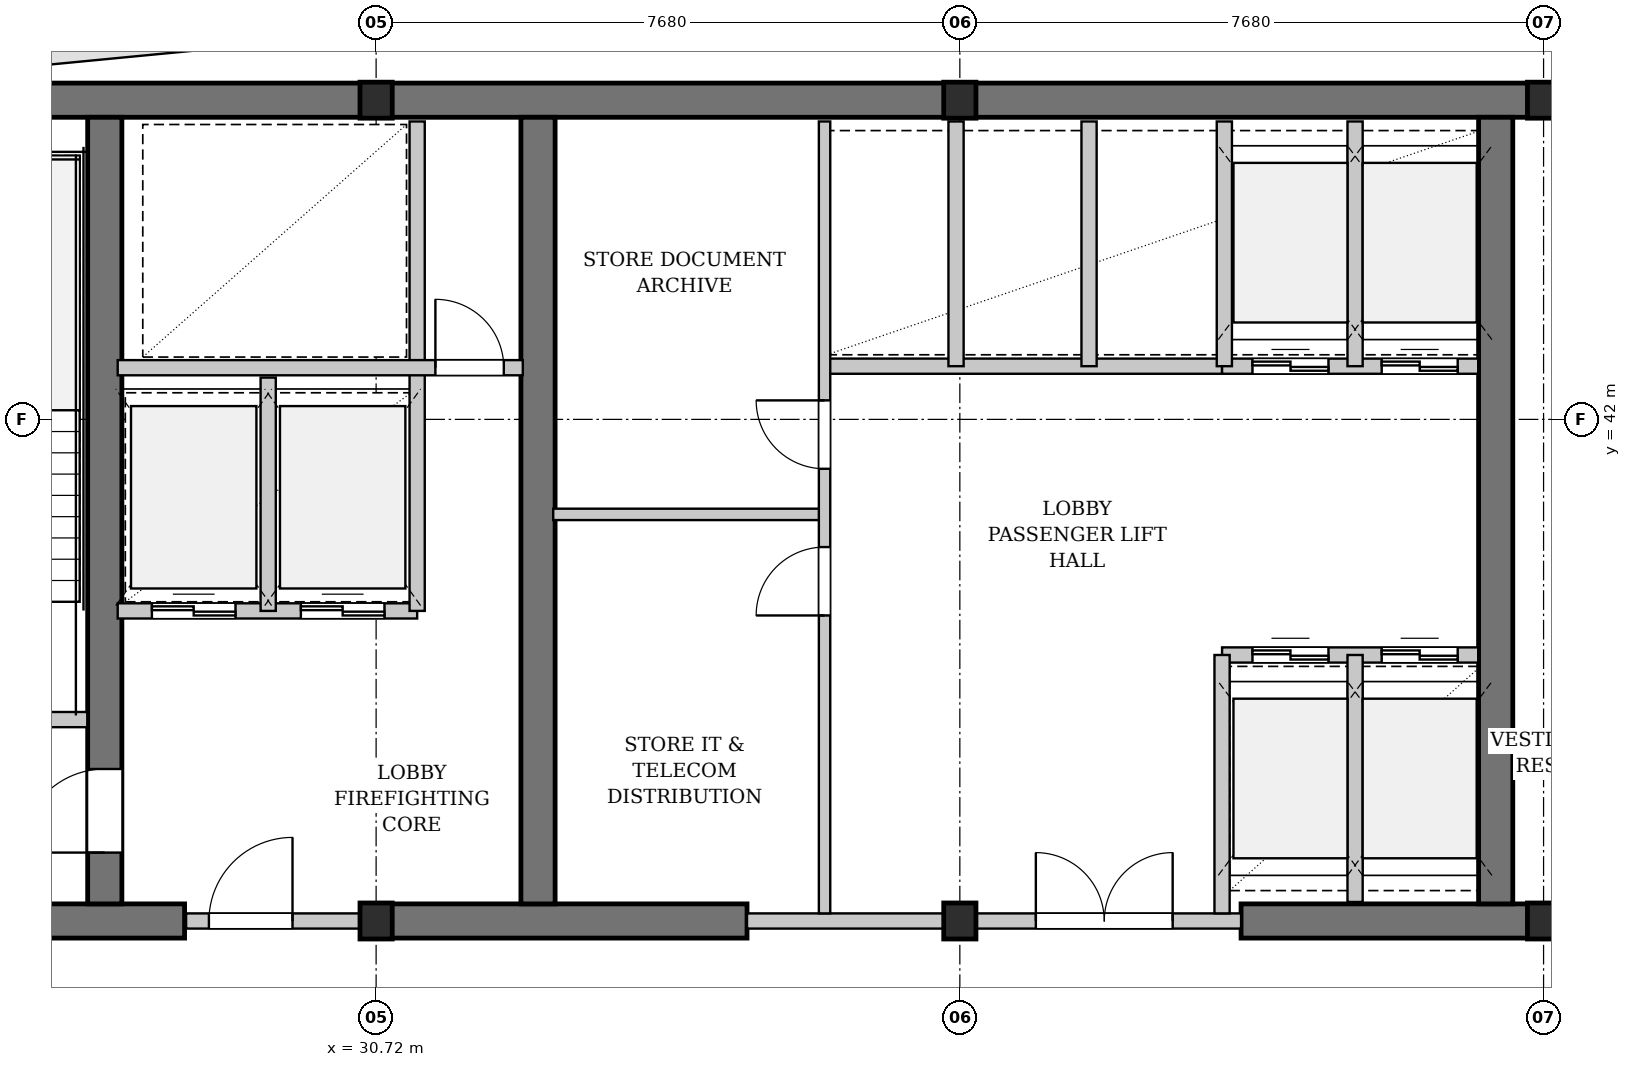
"""IFC4 building model, lengths in metres.
Left out: names, types, materials, properties, quantities, classifications, styles, units other than length and angle.
Written with IfcOpenShell. Run it as: python <this file> out.ifc"""

import sys

from ifc_helpers import new_model, si_unit, direction, frame, frame_2d, origin, origin_2d, place, context, subcontext, project, spatial, rectangle, i_section, extrude, element, fill, save


model = new_model("IFC4")
c1 = context("Model", 3, precision=1e-05, world=origin(), true_north=direction((0.0, 1.0)))
c2 = subcontext(c1, "Body", "Model", "MODEL_VIEW")
j1 = project(units=[si_unit("LENGTHUNIT", "METRE"), si_unit("PLANEANGLEUNIT", "RADIAN")], contexts=[c1])
p1 = place(None, origin())
s1 = spatial("IfcSite", under=j1, at=p1, CompositionType="ELEMENT")
p2 = place(p1, origin())
s2 = spatial("IfcBuilding", under=s1, at=p2, CompositionType="ELEMENT")
p3 = place(p2, frame((0.0, 0.0, 96.5)))
s3 = spatial("IfcBuildingStorey", under=s2, at=p3, CompositionType="ELEMENT", Elevation=96.5)
p4 = place(p3, frame((22.815, 46.2, 0.0), z_axis=(0.0, 0.0, 1.0), x_axis=(1.0, 0.0, 0.0)))
e1 = element("IfcWall", 1, at=p4, inside=s3, PredefinedType="SHEAR", context=c2, shape_type="SweptSolid", body=[
    extrude(rectangle(XDim=31.17, YDim=0.45, at=frame_2d((15.585, 0.0))), origin(), (0.0, 0.0, 1.0), 3.18),
])
p5 = place(p3, frame((22.815, 35.4, 0.0), z_axis=(0.0, 0.0, 1.0), x_axis=(1.0, 0.0, 0.0)))
e2 = element("IfcWall", 2, at=p5, inside=s3, PredefinedType="SHEAR", context=c2, shape_type="SweptSolid", body=[
    extrude(rectangle(XDim=5.385, YDim=0.45, at=frame_2d((2.692, 0.0))), origin(), (0.0, 0.0, 1.0), 3.18),
])
p6 = place(p3, frame((30.72, 35.4, 0.0), z_axis=(0.0, 0.0, 1.0), x_axis=(1.0, 0.0, 0.0)))
e3 = element("IfcWall", 3, at=p6, inside=s3, PredefinedType="SHEAR", context=c2, shape_type="SweptSolid", body=[
    extrude(rectangle(XDim=4.88, YDim=0.45, at=frame_2d((2.44, 0.0))), origin(), (0.0, 0.0, 1.0), 3.18),
])
p7 = place(p3, frame((42.1, 35.4, 0.0), z_axis=(0.0, 0.0, 1.0), x_axis=(1.0, 0.0, 0.0)))
e4 = element("IfcWall", 4, at=p7, inside=s3, PredefinedType="SHEAR", context=c2, shape_type="SweptSolid", body=[
    extrude(rectangle(XDim=8.05, YDim=0.45, at=frame_2d((4.025, 0.0))), origin(), (0.0, 0.0, 1.0), 3.18),
])
p8 = place(p7, frame((4.85, 0.0, 0.0)))
e5 = element("IfcOpeningElement", 5, at=p8, cuts=e4, PredefinedType="OPENING", context=c2, shape_type="SweptSolid", body=[
    extrude(rectangle(XDim=0.9, YDim=2.15, at=frame_2d((0.45, 1.075))), frame((0.0, 0.235, 0.0), z_axis=(0.0, -1.0, 0.0), x_axis=(1.0, 0.0, 0.0)), (0.0, 0.0, 1.0), 0.47),
])
p9 = place(p3, frame((27.15, 35.625, 0.0), z_axis=(0.0, 0.0, 1.0), x_axis=(0.0, 1.0, 0.0)))
e6 = element("IfcWall", 6, at=p9, inside=s3, PredefinedType="SHEAR", context=c2, shape_type="SweptSolid", body=[
    extrude(rectangle(XDim=10.35, YDim=0.45, at=frame_2d((5.175, 0.0))), origin(), (0.0, 0.0, 1.0), 3.18),
])
p10 = place(p9, frame((0.675, 0.0, 0.0)))
e7 = element("IfcOpeningElement", 7, at=p10, cuts=e6, PredefinedType="OPENING", context=c2, shape_type="SweptSolid", body=[
    extrude(rectangle(XDim=1.1, YDim=2.15, at=frame_2d((0.55, 1.075))), frame((0.0, 0.235, 0.0), z_axis=(0.0, -1.0, 0.0), x_axis=(1.0, 0.0, 0.0)), (0.0, 0.0, 1.0), 0.47),
])
for number, where, z_axis, x_axis in (
    (8, (32.85, 35.625, 0.0), (0.0, 0.0, 1.0), (0.0, 1.0, 0.0)),
    (9, (45.45, 35.625, 0.0), (0.0, 0.0, 1.0), (0.0, 1.0, 0.0)),
):
    element("IfcWall", number, at=place(p3, frame(where, z_axis=z_axis, x_axis=x_axis)), inside=s3, PredefinedType="SHEAR", context=c2, shape_type="SweptSolid", body=[
        extrude(rectangle(XDim=10.35, YDim=0.45, at=frame_2d((5.175, 0.0))), origin(), (0.0, 0.0, 1.0), 3.18),
    ])
for number, where, z_axis, x_axis in (
    (10, (30.72, 35.4, 0.0), (0.0, 0.0, 1.0), (1.0, 0.0, 0.0)),
    (11, (30.72, 46.2, 0.0), (0.0, 0.0, 1.0), (1.0, 0.0, 0.0)),
    (12, (38.4, 35.4, 0.0), (0.0, 0.0, 1.0), (1.0, 0.0, 0.0)),
    (13, (38.4, 46.2, 0.0), (0.0, 0.0, 1.0), (1.0, 0.0, 0.0)),
    (14, (46.08, 35.4, 0.0), (0.0, 0.0, 1.0), (1.0, 0.0, 0.0)),
    (15, (46.08, 46.2, 0.0), (0.0, 0.0, 1.0), (1.0, 0.0, 0.0)),
):
    element("IfcColumn", number, at=place(p3, frame(where, z_axis=z_axis, x_axis=x_axis)), inside=s3, PredefinedType="COLUMN", context=c2, shape_type="SweptSolid", body=[
        extrude(i_section(OverallWidth=0.424, OverallDepth=0.474, WebThickness=0.047, FlangeThickness=0.077, FilletRadius=0.015, at=origin_2d()), origin(), (0.0, 0.0, 1.0), 3.4),
    ])
p11 = place(p3, frame((23.3, 38.05, 0.0), z_axis=(0.0, 0.0, 1.0), x_axis=(1.0, 0.0, 0.0)))
e16 = element("IfcWall", 16, at=p11, inside=s3, PredefinedType="PARTITIONING", context=c2, shape_type="SweptSolid", body=[
    extrude(rectangle(XDim=3.62, YDim=0.2, at=frame_2d((1.81, 0.0))), origin(), (0.0, 0.0, 1.0), 3.18),
])
p12 = place(p11, frame((1.26, 0.0, 0.0)))
e17 = element("IfcOpeningElement", 17, at=p12, cuts=e16, PredefinedType="OPENING", context=c2, shape_type="SweptSolid", body=[
    extrude(rectangle(XDim=1.1, YDim=2.15, at=frame_2d((0.55, 1.075))), frame((0.0, 0.11, 0.0), z_axis=(0.0, -1.0, 0.0), x_axis=(1.0, 0.0, 0.0)), (0.0, 0.0, 1.0), 0.22),
])
p13 = place(p3, frame((28.22, 35.4, 0.0), z_axis=(0.0, 0.0, 1.0), x_axis=(1.0, 0.0, 0.0)))
e18 = element("IfcWall", 18, at=p13, inside=s3, PredefinedType="PARTITIONING", context=c2, shape_type="SweptSolid", body=[
    extrude(rectangle(XDim=2.5, YDim=0.2, at=frame_2d((1.25, 0.0))), origin(), (0.0, 0.0, 1.0), 2.525),
])
p14 = place(p13, frame((0.3, 0.0, 0.0)))
e19 = element("IfcOpeningElement", 19, at=p14, cuts=e18, PredefinedType="OPENING", context=c2, shape_type="SweptSolid", body=[
    extrude(rectangle(XDim=1.1, YDim=2.15, at=frame_2d((0.55, 1.075))), frame((0.0, 0.11, 0.0), z_axis=(0.0, -1.0, 0.0), x_axis=(1.0, 0.0, 0.0)), (0.0, 0.0, 1.0), 0.22),
])
p15 = place(p3, frame((27.32, 39.48, 0.0), z_axis=(0.0, 0.0, 1.0), x_axis=(1.0, 0.0, 0.0)))
e20 = element("IfcWall", 20, at=p15, inside=s3, PredefinedType="PARTITIONING", context=c2, shape_type="SweptSolid", body=[
    extrude(rectangle(XDim=3.94, YDim=0.2, at=frame_2d((1.97, 0.0))), origin(), (0.0, 0.0, 1.0), 3.18),
])
p16 = place(p15, frame((0.45, 0.0, 0.0)))
e21 = element("IfcOpeningElement", 21, at=p16, cuts=e20, PredefinedType="OPENING", context=c2, shape_type="SweptSolid", body=[
    extrude(rectangle(XDim=1.1, YDim=2.2, at=frame_2d((0.55, 1.1))), frame((0.0, 0.11, 0.0), z_axis=(0.0, -1.0, 0.0), x_axis=(1.0, 0.0, 0.0)), (0.0, 0.0, 1.0), 0.22),
])
p17 = place(p15, frame((2.41, 0.0, 0.0)))
e22 = element("IfcOpeningElement", 22, at=p17, cuts=e20, PredefinedType="OPENING", context=c2, shape_type="SweptSolid", body=[
    extrude(rectangle(XDim=1.1, YDim=2.2, at=frame_2d((0.55, 1.1))), frame((0.0, 0.11, 0.0), z_axis=(0.0, -1.0, 0.0), x_axis=(1.0, 0.0, 0.0)), (0.0, 0.0, 1.0), 0.22),
])
p18 = place(p3, frame((29.3, 39.48, 0.0), z_axis=(0.0, 0.0, 1.0), x_axis=(0.0, 1.0, 0.0)))
e23 = element("IfcWall", 23, at=p18, inside=s3, PredefinedType="PARTITIONING", context=c2, shape_type="SweptSolid", body=[
    extrude(rectangle(XDim=3.07, YDim=0.2, at=frame_2d((1.535, 0.0))), origin(), (0.0, 0.0, 1.0), 3.18),
])
p19 = place(p3, frame((31.26, 39.48, 0.0), z_axis=(0.0, 0.0, 1.0), x_axis=(0.0, 1.0, 0.0)))
e24 = element("IfcWall", 24, at=p19, inside=s3, PredefinedType="PARTITIONING", context=c2, shape_type="SweptSolid", body=[
    extrude(rectangle(XDim=6.44, YDim=0.2, at=frame_2d((3.22, 0.0))), origin(), (0.0, 0.0, 1.0), 3.18),
])
p20 = place(p3, frame((27.32, 42.68, 0.0), z_axis=(0.0, 0.0, 1.0), x_axis=(1.0, 0.0, 0.0)))
e25 = element("IfcWall", 25, at=p20, inside=s3, PredefinedType="PARTITIONING", context=c2, shape_type="SweptSolid", body=[
    extrude(rectangle(XDim=5.33, YDim=0.2, at=frame_2d((2.665, 0.0))), origin(), (0.0, 0.0, 1.0), 3.18),
])
p21 = place(p20, frame((4.18, 0.0, 0.0)))
e26 = element("IfcOpeningElement", 26, at=p21, cuts=e25, PredefinedType="OPENING", context=c2, shape_type="SweptSolid", body=[
    extrude(rectangle(XDim=0.9, YDim=2.15, at=frame_2d((0.45, 1.075))), frame((0.0, 0.11, 0.0), z_axis=(0.0, -1.0, 0.0), x_axis=(1.0, 0.0, 0.0)), (0.0, 0.0, 1.0), 0.22),
])
p22 = place(p3, frame((35.6, 35.4, 0.0), z_axis=(0.0, 0.0, 1.0), x_axis=(1.0, 0.0, 0.0)))
e27 = element("IfcWall", 27, at=p22, inside=s3, PredefinedType="PARTITIONING", context=c2, shape_type="SweptSolid", body=[
    extrude(rectangle(XDim=6.5, YDim=0.2, at=frame_2d((3.25, 0.0))), origin(), (0.0, 0.0, 1.0), 2.525),
])
p23 = place(p22, frame((3.8, 0.0, 0.0)))
e28 = element("IfcOpeningElement", 28, at=p23, cuts=e27, PredefinedType="OPENING", context=c2, shape_type="SweptSolid", body=[
    extrude(rectangle(XDim=1.8, YDim=2.3, at=frame_2d((0.9, 1.15))), frame((0.0, 0.11, 0.0), z_axis=(0.0, -1.0, 0.0), x_axis=(1.0, 0.0, 0.0)), (0.0, 0.0, 1.0), 0.22),
])
p24 = place(p3, frame((36.6, 42.7, 0.0), z_axis=(0.0, 0.0, 1.0), x_axis=(1.0, 0.0, 0.0)))
e29 = element("IfcWall", 29, at=p24, inside=s3, PredefinedType="PARTITIONING", context=c2, shape_type="SweptSolid", body=[
    extrude(rectangle(XDim=5.25, YDim=0.2, at=frame_2d((2.625, 0.0))), origin(), (0.0, 0.0, 1.0), 3.18),
])
p25 = place(p3, frame((38.35, 42.7, 0.0), z_axis=(0.0, 0.0, 1.0), x_axis=(0.0, 1.0, 0.0)))
e30 = element("IfcWall", 30, at=p25, inside=s3, PredefinedType="PARTITIONING", context=c2, shape_type="SweptSolid", body=[
    extrude(rectangle(XDim=3.22, YDim=0.2, at=frame_2d((1.61, 0.0))), origin(), (0.0, 0.0, 1.0), 2.525),
])
p26 = place(p3, frame((40.1, 42.7, 0.0), z_axis=(0.0, 0.0, 1.0), x_axis=(0.0, 1.0, 0.0)))
e31 = element("IfcWall", 31, at=p26, inside=s3, PredefinedType="PARTITIONING", context=c2, shape_type="SweptSolid", body=[
    extrude(rectangle(XDim=3.22, YDim=0.2, at=frame_2d((1.61, 0.0))), origin(), (0.0, 0.0, 1.0), 3.18),
])
p27 = place(p3, frame((33.05, 40.75, 0.0), z_axis=(0.0, 0.0, 1.0), x_axis=(1.0, 0.0, 0.0)))
e32 = element("IfcWall", 32, at=p27, inside=s3, PredefinedType="PARTITIONING", context=c2, shape_type="SweptSolid", body=[
    extrude(rectangle(XDim=3.57, YDim=0.15, at=frame_2d((1.785, 0.0))), origin(), (0.0, 0.0, 1.0), 3.18),
])
p28 = place(p3, frame((36.62, 35.5, 0.0), z_axis=(0.0, 0.0, 1.0), x_axis=(0.0, 1.0, 0.0)))
e33 = element("IfcWall", 33, at=p28, inside=s3, PredefinedType="PARTITIONING", context=c2, shape_type="SweptSolid", body=[
    extrude(rectangle(XDim=10.42, YDim=0.15, at=frame_2d((5.21, 0.0))), origin(), (0.0, 0.0, 1.0), 3.18),
])
p29 = place(p28, frame((3.92, 0.0, 0.0)))
e34 = element("IfcOpeningElement", 34, at=p29, cuts=e33, PredefinedType="OPENING", context=c2, shape_type="SweptSolid", body=[
    extrude(rectangle(XDim=0.9, YDim=2.15, at=frame_2d((0.45, 1.075))), frame((0.0, 0.085, 0.0), z_axis=(0.0, -1.0, 0.0), x_axis=(1.0, 0.0, 0.0)), (0.0, 0.0, 1.0), 0.17),
])
p30 = place(p28, frame((5.85, 0.0, 0.0)))
e35 = element("IfcOpeningElement", 35, at=p30, cuts=e33, PredefinedType="OPENING", context=c2, shape_type="SweptSolid", body=[
    extrude(rectangle(XDim=0.9, YDim=2.15, at=frame_2d((0.45, 1.075))), frame((0.0, 0.085, 0.0), z_axis=(0.0, -1.0, 0.0), x_axis=(1.0, 0.0, 0.0)), (0.0, 0.0, 1.0), 0.17),
])
p31 = place(p3, frame((41.85, 38.9, 0.0), z_axis=(0.0, 0.0, 1.0), x_axis=(1.0, 0.0, 0.0)))
e36 = element("IfcWall", 36, at=p31, inside=s3, PredefinedType="PARTITIONING", context=c2, shape_type="SweptSolid", body=[
    extrude(rectangle(XDim=3.37, YDim=0.2, at=frame_2d((1.685, 0.0))), origin(), (0.0, 0.0, 1.0), 3.18),
])
p32 = place(p31, frame((0.4, 0.0, 0.0)))
e37 = element("IfcOpeningElement", 37, at=p32, cuts=e36, PredefinedType="OPENING", context=c2, shape_type="SweptSolid", body=[
    extrude(rectangle(XDim=1.0, YDim=2.2, at=frame_2d((0.5, 1.1))), frame((0.0, 0.11, 0.0), z_axis=(0.0, -1.0, 0.0), x_axis=(1.0, 0.0, 0.0)), (0.0, 0.0, 1.0), 0.22),
])
p33 = place(p31, frame((2.1, 0.0, 0.0)))
e38 = element("IfcOpeningElement", 38, at=p33, cuts=e36, PredefinedType="OPENING", context=c2, shape_type="SweptSolid", body=[
    extrude(rectangle(XDim=1.0, YDim=2.2, at=frame_2d((0.5, 1.1))), frame((0.0, 0.11, 0.0), z_axis=(0.0, -1.0, 0.0), x_axis=(1.0, 0.0, 0.0)), (0.0, 0.0, 1.0), 0.22),
])
p34 = place(p3, frame((41.85, 42.7, 0.0), z_axis=(0.0, 0.0, 1.0), x_axis=(1.0, 0.0, 0.0)))
e39 = element("IfcWall", 39, at=p34, inside=s3, PredefinedType="PARTITIONING", context=c2, shape_type="SweptSolid", body=[
    extrude(rectangle(XDim=3.37, YDim=0.2, at=frame_2d((1.685, 0.0))), origin(), (0.0, 0.0, 1.0), 3.18),
])
p35 = place(p34, frame((0.4, 0.0, 0.0)))
e40 = element("IfcOpeningElement", 40, at=p35, cuts=e39, PredefinedType="OPENING", context=c2, shape_type="SweptSolid", body=[
    extrude(rectangle(XDim=1.0, YDim=2.2, at=frame_2d((0.5, 1.1))), frame((0.0, 0.11, 0.0), z_axis=(0.0, -1.0, 0.0), x_axis=(1.0, 0.0, 0.0)), (0.0, 0.0, 1.0), 0.22),
])
p36 = place(p34, frame((2.1, 0.0, 0.0)))
e41 = element("IfcOpeningElement", 41, at=p36, cuts=e39, PredefinedType="OPENING", context=c2, shape_type="SweptSolid", body=[
    extrude(rectangle(XDim=1.0, YDim=2.2, at=frame_2d((0.5, 1.1))), frame((0.0, 0.11, 0.0), z_axis=(0.0, -1.0, 0.0), x_axis=(1.0, 0.0, 0.0)), (0.0, 0.0, 1.0), 0.22),
])
p37 = place(p3, frame((43.6, 35.65, 0.0), z_axis=(0.0, 0.0, 1.0), x_axis=(0.0, 1.0, 0.0)))
e42 = element("IfcWall", 42, at=p37, inside=s3, PredefinedType="PARTITIONING", context=c2, shape_type="SweptSolid", body=[
    extrude(rectangle(XDim=3.25, YDim=0.2, at=frame_2d((1.625, 0.0))), origin(), (0.0, 0.0, 1.0), 3.18),
])
p38 = place(p3, frame((43.6, 42.7, 0.0), z_axis=(0.0, 0.0, 1.0), x_axis=(0.0, 1.0, 0.0)))
e43 = element("IfcWall", 43, at=p38, inside=s3, PredefinedType="PARTITIONING", context=c2, shape_type="SweptSolid", body=[
    extrude(rectangle(XDim=3.22, YDim=0.2, at=frame_2d((1.61, 0.0))), origin(), (0.0, 0.0, 1.0), 3.18),
])
p39 = place(p3, frame((41.85, 35.5, 0.0), z_axis=(0.0, 0.0, 1.0), x_axis=(0.0, 1.0, 0.0)))
e44 = element("IfcWall", 44, at=p39, inside=s3, PredefinedType="PARTITIONING", context=c2, shape_type="SweptSolid", body=[
    extrude(rectangle(XDim=3.4, YDim=0.2, at=frame_2d((1.7, 0.0))), origin(), (0.0, 0.0, 1.0), 3.18),
])
p40 = place(p3, frame((41.88, 42.7, 0.0), z_axis=(0.0, 0.0, 1.0), x_axis=(0.0, 1.0, 0.0)))
e45 = element("IfcWall", 45, at=p40, inside=s3, PredefinedType="PARTITIONING", context=c2, shape_type="SweptSolid", body=[
    extrude(rectangle(XDim=3.22, YDim=0.2, at=frame_2d((1.61, 0.0))), origin(), (0.0, 0.0, 1.0), 3.18),
])
p41 = place(p14, origin())
e46 = element("IfcDoor", 46, at=p41, inside=s3, OperationType="SINGLE_SWING_RIGHT", PredefinedType="DOOR", context=c2, shape_type="SweptSolid", body=[
    extrude(rectangle(XDim=1.1, YDim=2.15, at=frame_2d((0.55, 1.075))), frame((0.0, 0.025, 0.0), z_axis=(0.0, -1.0, 0.0), x_axis=(1.0, 0.0, 0.0)), (0.0, 0.0, 1.0), 0.05),
])
fill(e19, e46)
p42 = place(p16, origin())
e47 = element("IfcDoor", 47, at=p42, inside=s3, OperationType="DOUBLE_DOOR_SLIDING", PredefinedType="DOOR", context=c2, shape_type="SweptSolid", body=[
    extrude(rectangle(XDim=1.1, YDim=2.2, at=frame_2d((0.55, 1.1))), frame((0.0, 0.025, 0.0), z_axis=(0.0, -1.0, 0.0), x_axis=(1.0, 0.0, 0.0)), (0.0, 0.0, 1.0), 0.05),
])
fill(e21, e47)
p43 = place(p17, origin())
e48 = element("IfcDoor", 48, at=p43, inside=s3, OperationType="DOUBLE_DOOR_SLIDING", PredefinedType="DOOR", context=c2, shape_type="SweptSolid", body=[
    extrude(rectangle(XDim=1.1, YDim=2.2, at=frame_2d((0.55, 1.1))), frame((0.0, 0.025, 0.0), z_axis=(0.0, -1.0, 0.0), x_axis=(1.0, 0.0, 0.0)), (0.0, 0.0, 1.0), 0.05),
])
fill(e22, e48)
p44 = place(p21, origin())
e49 = element("IfcDoor", 49, at=p44, inside=s3, OperationType="SINGLE_SWING_LEFT", PredefinedType="DOOR", context=c2, shape_type="SweptSolid", body=[
    extrude(rectangle(XDim=0.9, YDim=2.15, at=frame_2d((0.45, 1.075))), frame((0.0, 0.025, 0.0), z_axis=(0.0, -1.0, 0.0), x_axis=(1.0, 0.0, 0.0)), (0.0, 0.0, 1.0), 0.05),
])
fill(e26, e49)
p45 = place(p23, origin())
e50 = element("IfcDoor", 50, at=p45, inside=s3, OperationType="DOUBLE_DOOR_SINGLE_SWING", PredefinedType="DOOR", context=c2, shape_type="SweptSolid", body=[
    extrude(rectangle(XDim=1.8, YDim=2.3, at=frame_2d((0.9, 1.15))), frame((0.0, 0.025, 0.0), z_axis=(0.0, -1.0, 0.0), x_axis=(1.0, 0.0, 0.0)), (0.0, 0.0, 1.0), 0.05),
])
fill(e28, e50)
p46 = place(p29, origin())
e51 = element("IfcDoor", 51, at=p46, inside=s3, OperationType="SINGLE_SWING_LEFT", PredefinedType="DOOR", context=c2, shape_type="SweptSolid", body=[
    extrude(rectangle(XDim=0.9, YDim=2.15, at=frame_2d((0.45, 1.075))), frame((0.0, 0.025, 0.0), z_axis=(0.0, -1.0, 0.0), x_axis=(1.0, 0.0, 0.0)), (0.0, 0.0, 1.0), 0.05),
])
fill(e34, e51)
p47 = place(p30, origin())
e52 = element("IfcDoor", 52, at=p47, inside=s3, OperationType="SINGLE_SWING_RIGHT", PredefinedType="DOOR", context=c2, shape_type="SweptSolid", body=[
    extrude(rectangle(XDim=0.9, YDim=2.15, at=frame_2d((0.45, 1.075))), frame((0.0, 0.025, 0.0), z_axis=(0.0, -1.0, 0.0), x_axis=(1.0, 0.0, 0.0)), (0.0, 0.0, 1.0), 0.05),
])
fill(e35, e52)
p48 = place(p32, origin())
e53 = element("IfcDoor", 53, at=p48, inside=s3, OperationType="DOUBLE_DOOR_SLIDING", PredefinedType="DOOR", context=c2, shape_type="SweptSolid", body=[
    extrude(rectangle(XDim=1.0, YDim=2.2, at=frame_2d((0.5, 1.1))), frame((0.0, 0.025, 0.0), z_axis=(0.0, -1.0, 0.0), x_axis=(1.0, 0.0, 0.0)), (0.0, 0.0, 1.0), 0.05),
])
fill(e37, e53)
p49 = place(p33, origin())
e54 = element("IfcDoor", 54, at=p49, inside=s3, OperationType="DOUBLE_DOOR_SLIDING", PredefinedType="DOOR", context=c2, shape_type="SweptSolid", body=[
    extrude(rectangle(XDim=1.0, YDim=2.2, at=frame_2d((0.5, 1.1))), frame((0.0, 0.025, 0.0), z_axis=(0.0, -1.0, 0.0), x_axis=(1.0, 0.0, 0.0)), (0.0, 0.0, 1.0), 0.05),
])
fill(e38, e54)
p50 = place(p35, origin())
e55 = element("IfcDoor", 55, at=p50, inside=s3, OperationType="DOUBLE_DOOR_SLIDING", PredefinedType="DOOR", context=c2, shape_type="SweptSolid", body=[
    extrude(rectangle(XDim=1.0, YDim=2.2, at=frame_2d((0.5, 1.1))), frame((0.0, 0.025, 0.0), z_axis=(0.0, -1.0, 0.0), x_axis=(1.0, 0.0, 0.0)), (0.0, 0.0, 1.0), 0.05),
])
fill(e40, e55)
p51 = place(p36, origin())
e56 = element("IfcDoor", 56, at=p51, inside=s3, OperationType="DOUBLE_DOOR_SLIDING", PredefinedType="DOOR", context=c2, shape_type="SweptSolid", body=[
    extrude(rectangle(XDim=1.0, YDim=2.2, at=frame_2d((0.5, 1.1))), frame((0.0, 0.025, 0.0), z_axis=(0.0, -1.0, 0.0), x_axis=(1.0, 0.0, 0.0)), (0.0, 0.0, 1.0), 0.05),
])
fill(e41, e56)
p52 = place(p10, origin())
e57 = element("IfcDoor", 57, at=p52, inside=s3, OperationType="SINGLE_SWING_LEFT", PredefinedType="DOOR", context=c2, shape_type="SweptSolid", body=[
    extrude(rectangle(XDim=1.1, YDim=2.15, at=frame_2d((0.55, 1.075))), frame((0.0, 0.025, 0.0), z_axis=(0.0, -1.0, 0.0), x_axis=(1.0, 0.0, 0.0)), (0.0, 0.0, 1.0), 0.05),
])
fill(e7, e57)
save(model, sys.argv[1])
